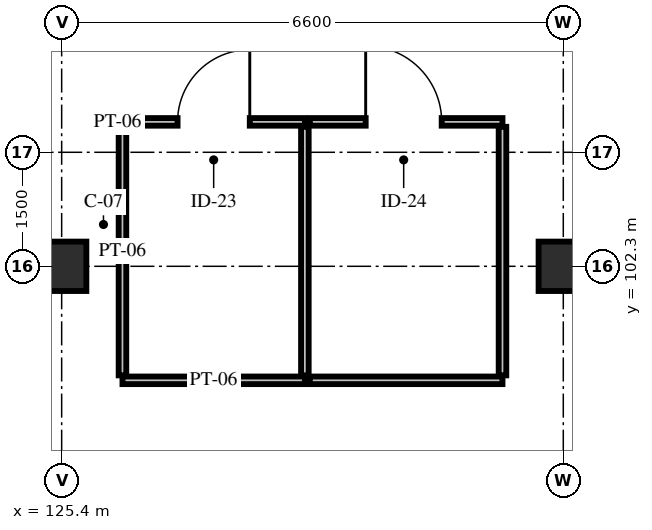
"""IFC4 building model, lengths in metres.
Left out: names, types, materials, properties, quantities, classifications, styles, units other than length and angle.
Written with IfcOpenShell. Run it as: python <this file> out.ifc"""

import sys

from ifc_helpers import new_model, si_unit, direction, frame, frame_2d, origin, origin_2d, place, context, subcontext, project, spatial, rectangle, extrude, element, fill, save


model = new_model("IFC4")
c1 = context("Model", 3, precision=1e-05, world=origin(), true_north=direction((0.0, 1.0)))
c2 = subcontext(c1, "Body", "Model", "MODEL_VIEW")
j1 = project(units=[si_unit("LENGTHUNIT", "METRE"), si_unit("PLANEANGLEUNIT", "RADIAN")], contexts=[c1])
p1 = place(None, origin())
s1 = spatial("IfcSite", under=j1, at=p1, CompositionType="ELEMENT")
p2 = place(p1, origin())
s2 = spatial("IfcBuilding", under=s1, at=p2, CompositionType="ELEMENT")
p3 = place(p2, frame((0.0, 0.0, 29.4)))
s3 = spatial("IfcBuildingStorey", under=s2, at=p3, CompositionType="ELEMENT", Elevation=29.4)
for number, where, z_axis, x_axis in (
    (1, (125.4, 102.3, 0.0), (0.0, 0.0, 1.0), (1.0, 0.0, 0.0)),
    (2, (132.0, 102.3, 0.0), (0.0, 0.0, 1.0), (1.0, 0.0, 0.0)),
):
    element("IfcColumn", number, at=place(p3, frame(where, z_axis=z_axis, x_axis=x_axis)), inside=s3, PredefinedType="COLUMN", context=c2, shape_type="SweptSolid", body=[
        extrude(rectangle(XDim=0.65, YDim=0.65, at=origin_2d()), origin(), (0.0, 0.0, 1.0), 4.8),
    ])
p4 = place(p3, frame((126.2, 100.8, 0.0), z_axis=(0.0, 0.0, 1.0), x_axis=(1.0, 0.0, 0.0)))
e3 = element("IfcWall", 3, at=p4, inside=s3, PredefinedType="PARTITIONING", context=c2, shape_type="SweptSolid", body=[
    extrude(rectangle(XDim=2.4, YDim=0.1, at=frame_2d((1.2, 0.0))), origin(), (0.0, 0.0, 1.0), 4.46),
])
p5 = place(p3, frame((126.2, 104.2, 0.0), z_axis=(0.0, 0.0, 1.0), x_axis=(1.0, 0.0, 0.0)))
e4 = element("IfcWall", 4, at=p5, inside=s3, PredefinedType="PARTITIONING", context=c2, shape_type="SweptSolid", body=[
    extrude(rectangle(XDim=2.4, YDim=0.1, at=frame_2d((1.2, 0.0))), origin(), (0.0, 0.0, 1.0), 4.46),
])
p6 = place(p5, frame((0.725, 0.0, 0.0)))
e5 = element("IfcOpeningElement", 5, at=p6, cuts=e4, PredefinedType="OPENING", context=c2, shape_type="SweptSolid", body=[
    extrude(rectangle(XDim=0.95, YDim=2.15, at=frame_2d((0.475, 1.075))), frame((0.0, 0.065, 0.0), z_axis=(0.0, -1.0, 0.0), x_axis=(1.0, 0.0, 0.0)), (0.0, 0.0, 1.0), 0.13),
])
for number, where, z_axis, x_axis in (
    (6, (126.2, 100.865, 0.0), (0.0, 0.0, 1.0), (0.0, 1.0, 0.0)),
    (7, (128.6, 100.865, 0.0), (0.0, 0.0, 1.0), (0.0, 1.0, 0.0)),
):
    element("IfcWall", number, at=place(p3, frame(where, z_axis=z_axis, x_axis=x_axis)), inside=s3, PredefinedType="PARTITIONING", context=c2, shape_type="SweptSolid", body=[
        extrude(rectangle(XDim=3.27, YDim=0.1, at=frame_2d((1.635, 0.0))), origin(), (0.0, 0.0, 1.0), 4.065),
    ])
p7 = place(p3, frame((128.665, 100.8, 0.0), z_axis=(0.0, 0.0, 1.0), x_axis=(1.0, 0.0, 0.0)))
e8 = element("IfcWall", 8, at=p7, inside=s3, PredefinedType="PARTITIONING", context=c2, shape_type="SweptSolid", body=[
    extrude(rectangle(XDim=2.535, YDim=0.1, at=frame_2d((1.268, 0.0))), origin(), (0.0, 0.0, 1.0), 4.46),
])
p8 = place(p3, frame((128.665, 104.2, 0.0), z_axis=(0.0, 0.0, 1.0), x_axis=(1.0, 0.0, 0.0)))
e9 = element("IfcWall", 9, at=p8, inside=s3, PredefinedType="PARTITIONING", context=c2, shape_type="SweptSolid", body=[
    extrude(rectangle(XDim=2.535, YDim=0.1, at=frame_2d((1.268, 0.0))), origin(), (0.0, 0.0, 1.0), 4.46),
])
p9 = place(p8, frame((0.735, 0.0, 0.0)))
e10 = element("IfcOpeningElement", 10, at=p9, cuts=e9, PredefinedType="OPENING", context=c2, shape_type="SweptSolid", body=[
    extrude(rectangle(XDim=1.0, YDim=2.15, at=frame_2d((0.5, 1.075))), frame((0.0, 0.065, 0.0), z_axis=(0.0, -1.0, 0.0), x_axis=(1.0, 0.0, 0.0)), (0.0, 0.0, 1.0), 0.13),
])
p10 = place(p3, frame((131.2, 100.865, 0.0), z_axis=(0.0, 0.0, 1.0), x_axis=(0.0, 1.0, 0.0)))
e11 = element("IfcWall", 11, at=p10, inside=s3, PredefinedType="PARTITIONING", context=c2, shape_type="SweptSolid", body=[
    extrude(rectangle(XDim=3.27, YDim=0.1, at=frame_2d((1.635, 0.0))), origin(), (0.0, 0.0, 1.0), 4.065),
])
p11 = place(p6, origin())
e12 = element("IfcDoor", 12, at=p11, inside=s3, OperationType="SINGLE_SWING_RIGHT", PredefinedType="DOOR", context=c2, shape_type="SweptSolid", body=[
    extrude(rectangle(XDim=0.95, YDim=2.15, at=frame_2d((0.475, 1.075))), frame((0.0, 0.025, 0.0), z_axis=(0.0, -1.0, 0.0), x_axis=(1.0, 0.0, 0.0)), (0.0, 0.0, 1.0), 0.05),
])
fill(e5, e12)
p12 = place(p9, origin())
e13 = element("IfcDoor", 13, at=p12, inside=s3, OperationType="SINGLE_SWING_LEFT", PredefinedType="DOOR", context=c2, shape_type="SweptSolid", body=[
    extrude(rectangle(XDim=1.0, YDim=2.15, at=frame_2d((0.5, 1.075))), frame((0.0, 0.025, 0.0), z_axis=(0.0, -1.0, 0.0), x_axis=(1.0, 0.0, 0.0)), (0.0, 0.0, 1.0), 0.05),
])
fill(e10, e13)
save(model, sys.argv[1])
